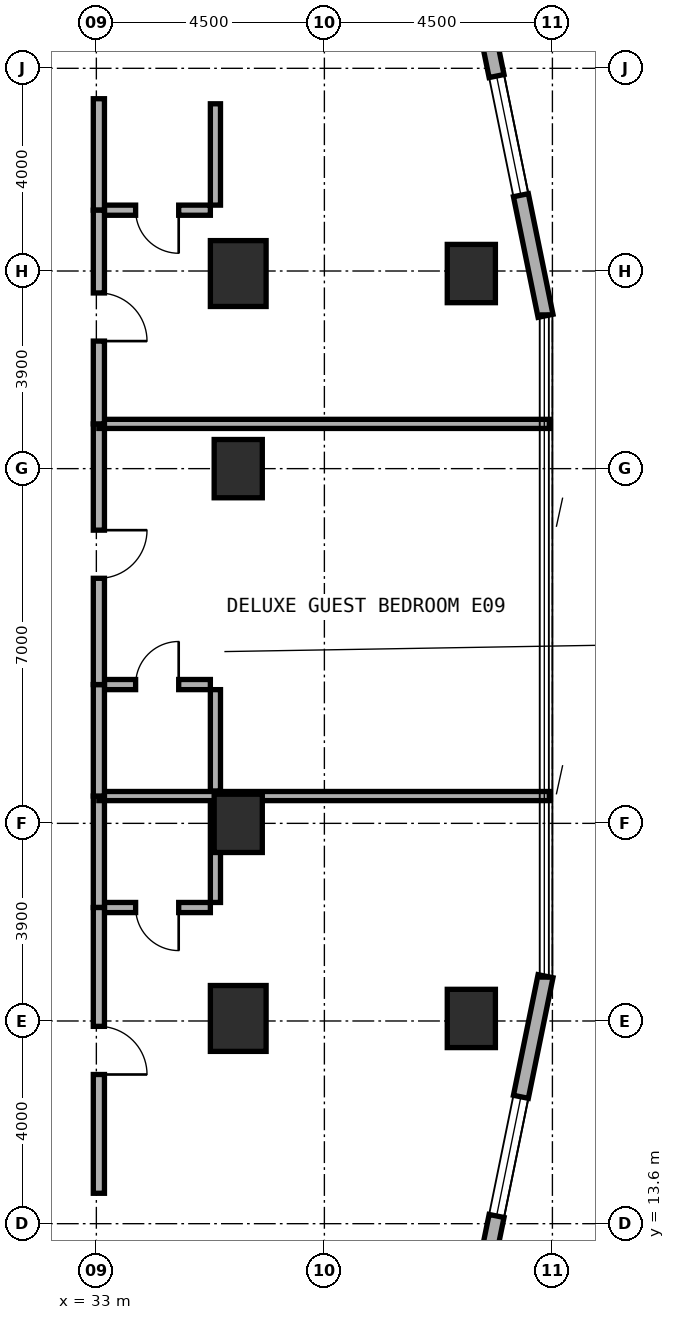
"""IFC4 building model, lengths in metres.
Left out: names, types, materials, properties, quantities, classifications, styles, units other than length and angle.
Written with IfcOpenShell. Run it as: python <this file> out.ifc"""

import sys

from ifc_helpers import new_model, si_unit, direction, frame, frame_2d, origin, origin_2d, place, context, subcontext, project, spatial, rectangle, extrude, element, fill, save


model = new_model("IFC4")
c1 = context("Model", 3, precision=1e-05, world=origin(), true_north=direction((0.0, 1.0)))
c2 = subcontext(c1, "Body", "Model", "MODEL_VIEW")
j1 = project(units=[si_unit("LENGTHUNIT", "METRE"), si_unit("PLANEANGLEUNIT", "RADIAN")], contexts=[c1])
p1 = place(None, origin())
s1 = spatial("IfcSite", under=j1, at=p1, CompositionType="ELEMENT")
p2 = place(p1, origin())
s2 = spatial("IfcBuilding", under=s1, at=p2, CompositionType="ELEMENT")
p3 = place(p2, frame((0.0, 0.0, 27.5)))
s3 = spatial("IfcBuildingStorey", under=s2, at=p3, CompositionType="ELEMENT", Elevation=27.5)
for number, where, z_axis, x_axis in (
    (1, (35.8, 21.5, 0.0), (0.0, 0.0, 1.0), (1.0, 0.0, 0.0)),
    (2, (35.8, 28.5, 0.0), (0.0, 0.0, 1.0), (1.0, 0.0, 0.0)),
):
    element("IfcColumn", number, at=place(p3, frame(where, z_axis=z_axis, x_axis=x_axis)), inside=s3, PredefinedType="COLUMN", context=c2, shape_type="SweptSolid", body=[
        extrude(rectangle(XDim=0.95, YDim=1.15, at=origin_2d()), origin(), (0.0, 0.0, 1.0), 3.5),
    ])
for number, where, z_axis, x_axis in (
    (3, (35.8, 17.65, 0.0), (0.0, 0.0, 1.0), (1.0, 0.0, 0.0)),
    (4, (35.8, 32.35, 0.0), (0.0, 0.0, 1.0), (1.0, 0.0, 0.0)),
):
    element("IfcColumn", number, at=place(p3, frame(where, z_axis=z_axis, x_axis=x_axis)), inside=s3, PredefinedType="COLUMN", context=c2, shape_type="SweptSolid", body=[
        extrude(rectangle(XDim=1.1, YDim=1.3, at=origin_2d()), origin(), (0.0, 0.0, 1.0), 3.5),
    ])
for number, where, z_axis, x_axis in (
    (5, (40.4, 17.65, 0.0), (0.0, 0.0, 1.0), (1.0, 0.0, 0.0)),
    (6, (40.4, 32.35, 0.0), (0.0, 0.0, 1.0), (1.0, 0.0, 0.0)),
):
    element("IfcColumn", number, at=place(p3, frame(where, z_axis=z_axis, x_axis=x_axis)), inside=s3, PredefinedType="COLUMN", context=c2, shape_type="SweptSolid", body=[
        extrude(rectangle(XDim=0.95, YDim=1.15, at=origin_2d()), origin(), (0.0, 0.0, 1.0), 3.5),
    ])
p4 = place(p3, frame((39.851, 8.622, 0.0), z_axis=(0.0, 0.0, 1.0), x_axis=(0.199990901713, 0.979797754249, 0.0)))
e7 = element("IfcWall", 7, at=p4, inside=s3, PredefinedType="STANDARD", context=c2, shape_type="SweptSolid", body=[
    extrude(rectangle(XDim=10.065, YDim=0.3, at=frame_2d((5.033, 0.0))), origin(), (0.0, 0.0, 1.0), 3.22),
])
p5 = place(p4, frame((0.378, 0.0, 0.85)))
e8 = element("IfcOpeningElement", 8, at=p5, cuts=e7, PredefinedType="OPENING", context=c2, shape_type="SweptSolid", body=[
    extrude(rectangle(XDim=1.8, YDim=1.5, at=frame_2d((0.9, 0.75))), frame((0.0, 0.16, 0.0), z_axis=(0.0, -1.0, 0.0), x_axis=(1.0, 0.0, 0.0)), (0.0, 0.0, 1.0), 0.32),
])
p6 = place(p4, frame((5.236, 0.0, 0.8)))
e9 = element("IfcOpeningElement", 9, at=p6, cuts=e7, PredefinedType="OPENING", context=c2, shape_type="SweptSolid", body=[
    extrude(rectangle(XDim=2.4, YDim=1.6, at=frame_2d((1.2, 0.8))), frame((0.0, 0.16, 0.0), z_axis=(0.0, -1.0, 0.0), x_axis=(1.0, 0.0, 0.0)), (0.0, 0.0, 1.0), 0.32),
])
p7 = place(p3, frame((41.864, 31.516, 0.0), z_axis=(0.0, 0.0, 1.0), x_axis=(-0.199990901713, 0.979797754249, 0.0)))
e10 = element("IfcWall", 10, at=p7, inside=s3, PredefinedType="STANDARD", context=c2, shape_type="SweptSolid", body=[
    extrude(rectangle(XDim=10.065, YDim=0.3, at=frame_2d((5.033, 0.0))), origin(), (0.0, 0.0, 1.0), 3.22),
])
p8 = place(p7, frame((2.429, 0.0, 0.8)))
e11 = element("IfcOpeningElement", 11, at=p8, cuts=e10, PredefinedType="OPENING", context=c2, shape_type="SweptSolid", body=[
    extrude(rectangle(XDim=2.4, YDim=1.6, at=frame_2d((1.2, 0.8))), frame((0.0, 0.16, 0.0), z_axis=(0.0, -1.0, 0.0), x_axis=(1.0, 0.0, 0.0)), (0.0, 0.0, 1.0), 0.32),
])
p9 = place(p7, frame((7.887, 0.0, 0.85)))
e12 = element("IfcOpeningElement", 12, at=p9, cuts=e10, PredefinedType="OPENING", context=c2, shape_type="SweptSolid", body=[
    extrude(rectangle(XDim=1.8, YDim=1.5, at=frame_2d((0.9, 0.75))), frame((0.0, 0.16, 0.0), z_axis=(0.0, -1.0, 0.0), x_axis=(1.0, 0.0, 0.0)), (0.0, 0.0, 1.0), 0.32),
])
p10 = place(p3, frame((33.15, 19.839, 0.0), z_axis=(0.0, 0.0, 1.0), x_axis=(1.0, 0.0, 0.0)))
e13 = element("IfcWall", 13, at=p10, inside=s3, PredefinedType="PLUMBINGWALL", context=c2, shape_type="SweptSolid", body=[
    extrude(rectangle(XDim=2.1, YDim=0.2, at=frame_2d((1.05, 0.0))), origin(), (0.0, 0.0, 1.0), 3.22),
])
p11 = place(p10, frame((0.625, 0.0, 0.0)))
e14 = element("IfcOpeningElement", 14, at=p11, cuts=e13, PredefinedType="OPENING", context=c2, shape_type="SweptSolid", body=[
    extrude(rectangle(XDim=0.85, YDim=2.1, at=frame_2d((0.425, 1.05))), frame((0.0, 0.11, 0.0), z_axis=(0.0, -1.0, 0.0), x_axis=(1.0, 0.0, 0.0)), (0.0, 0.0, 1.0), 0.22),
])
p12 = place(p3, frame((35.35, 19.939, 0.0), z_axis=(0.0, 0.0, 1.0), x_axis=(0.0, 1.0, 0.0)))
e15 = element("IfcWall", 15, at=p12, inside=s3, PredefinedType="PLUMBINGWALL", context=c2, shape_type="SweptSolid", body=[
    extrude(rectangle(XDim=2.0, YDim=0.2, at=frame_2d((1.0, 0.0))), origin(), (0.0, 0.0, 1.0), 2.395),
])
p13 = place(p3, frame((33.05, 19.839, 0.0), z_axis=(0.0, 0.0, 1.0), x_axis=(0.0, 1.0, 0.0)))
e16 = element("IfcWall", 16, at=p13, inside=s3, PredefinedType="SOLIDWALL", context=c2, shape_type="SweptSolid", body=[
    extrude(rectangle(XDim=2.2, YDim=0.22, at=frame_2d((1.1, 0.0))), origin(), (0.0, 0.0, 1.0), 2.395),
])
p14 = place(p3, frame((33.05, 14.2, 0.0), z_axis=(0.0, 0.0, 1.0), x_axis=(0.0, 1.0, 0.0)))
e17 = element("IfcWall", 17, at=p14, inside=s3, PredefinedType="SOLIDWALL", context=c2, shape_type="SweptSolid", body=[
    extrude(rectangle(XDim=5.639, YDim=0.22, at=frame_2d((2.82, 0.0))), origin(), (0.0, 0.0, 1.0), 2.395),
])
p15 = place(p14, frame((2.344, 0.0, 0.0)))
e18 = element("IfcOpeningElement", 18, at=p15, cuts=e17, PredefinedType="OPENING", context=c2, shape_type="SweptSolid", body=[
    extrude(rectangle(XDim=0.95, YDim=2.1, at=frame_2d((0.475, 1.05))), frame((0.0, 0.12, 0.0), z_axis=(0.0, -1.0, 0.0), x_axis=(1.0, 0.0, 0.0)), (0.0, 0.0, 1.0), 0.24),
])
p16 = place(p3, frame((33.05, 22.039, 0.0), z_axis=(0.0, 0.0, 1.0), x_axis=(1.0, 0.0, 0.0)))
e19 = element("IfcWall", 19, at=p16, inside=s3, PredefinedType="SOLIDWALL", context=c2, shape_type="SweptSolid", body=[
    extrude(rectangle(XDim=8.89, YDim=0.18, at=frame_2d((4.445, 0.0))), origin(), (0.0, 0.0, 1.0), 2.745),
])
p17 = place(p3, frame((33.15, 24.239, 0.0), z_axis=(0.0, 0.0, 1.0), x_axis=(1.0, 0.0, 0.0)))
e20 = element("IfcWall", 20, at=p17, inside=s3, PredefinedType="PLUMBINGWALL", context=c2, shape_type="SweptSolid", body=[
    extrude(rectangle(XDim=2.1, YDim=0.2, at=frame_2d((1.05, 0.0))), origin(), (0.0, 0.0, 1.0), 3.22),
])
p18 = place(p17, frame((0.625, 0.0, 0.0)))
e21 = element("IfcOpeningElement", 21, at=p18, cuts=e20, PredefinedType="OPENING", context=c2, shape_type="SweptSolid", body=[
    extrude(rectangle(XDim=0.85, YDim=2.1, at=frame_2d((0.425, 1.05))), frame((0.0, 0.11, 0.0), z_axis=(0.0, -1.0, 0.0), x_axis=(1.0, 0.0, 0.0)), (0.0, 0.0, 1.0), 0.22),
])
p19 = place(p3, frame((35.35, 22.139, 0.0), z_axis=(0.0, 0.0, 1.0), x_axis=(0.0, 1.0, 0.0)))
e22 = element("IfcWall", 22, at=p19, inside=s3, PredefinedType="PLUMBINGWALL", context=c2, shape_type="SweptSolid", body=[
    extrude(rectangle(XDim=2.0, YDim=0.2, at=frame_2d((1.0, 0.0))), origin(), (0.0, 0.0, 1.0), 3.22),
])
p20 = place(p3, frame((33.05, 22.039, 0.0), z_axis=(0.0, 0.0, 1.0), x_axis=(0.0, 1.0, 0.0)))
e23 = element("IfcWall", 23, at=p20, inside=s3, PredefinedType="SOLIDWALL", context=c2, shape_type="SweptSolid", body=[
    extrude(rectangle(XDim=2.2, YDim=0.22, at=frame_2d((1.1, 0.0))), origin(), (0.0, 0.0, 1.0), 3.22),
])
p21 = place(p3, frame((33.05, 24.239, 0.0), z_axis=(0.0, 0.0, 1.0), x_axis=(0.0, 1.0, 0.0)))
e24 = element("IfcWall", 24, at=p21, inside=s3, PredefinedType="SOLIDWALL", context=c2, shape_type="SweptSolid", body=[
    extrude(rectangle(XDim=5.144, YDim=0.22, at=frame_2d((2.572, 0.0))), origin(), (0.0, 0.0, 1.0), 2.395),
])
p22 = place(p21, frame((2.097, 0.0, 0.0)))
e25 = element("IfcOpeningElement", 25, at=p22, cuts=e24, PredefinedType="OPENING", context=c2, shape_type="SweptSolid", body=[
    extrude(rectangle(XDim=0.95, YDim=2.1, at=frame_2d((0.475, 1.05))), frame((0.0, 0.12, 0.0), z_axis=(0.0, -1.0, 0.0), x_axis=(1.0, 0.0, 0.0)), (0.0, 0.0, 1.0), 0.24),
])
p23 = place(p3, frame((33.05, 29.383, 0.0), z_axis=(0.0, 0.0, 1.0), x_axis=(1.0, 0.0, 0.0)))
e26 = element("IfcWall", 26, at=p23, inside=s3, PredefinedType="SOLIDWALL", context=c2, shape_type="SweptSolid", body=[
    extrude(rectangle(XDim=8.89, YDim=0.18, at=frame_2d((4.445, 0.0))), origin(), (0.0, 0.0, 1.0), 2.745),
])
p24 = place(p3, frame((33.15, 33.6, 0.0), z_axis=(0.0, 0.0, 1.0), x_axis=(1.0, 0.0, 0.0)))
e27 = element("IfcWall", 27, at=p24, inside=s3, PredefinedType="PLUMBINGWALL", context=c2, shape_type="SweptSolid", body=[
    extrude(rectangle(XDim=2.1, YDim=0.2, at=frame_2d((1.05, 0.0))), origin(), (0.0, 0.0, 1.0), 3.22),
])
p25 = place(p24, frame((0.625, 0.0, 0.0)))
e28 = element("IfcOpeningElement", 28, at=p25, cuts=e27, PredefinedType="OPENING", context=c2, shape_type="SweptSolid", body=[
    extrude(rectangle(XDim=0.85, YDim=2.1, at=frame_2d((0.425, 1.05))), frame((0.0, 0.11, 0.0), z_axis=(0.0, -1.0, 0.0), x_axis=(1.0, 0.0, 0.0)), (0.0, 0.0, 1.0), 0.22),
])
p26 = place(p3, frame((35.35, 33.7, 0.0), z_axis=(0.0, 0.0, 1.0), x_axis=(0.0, 1.0, 0.0)))
e29 = element("IfcWall", 29, at=p26, inside=s3, PredefinedType="PLUMBINGWALL", context=c2, shape_type="SweptSolid", body=[
    extrude(rectangle(XDim=2.0, YDim=0.2, at=frame_2d((1.0, 0.0))), origin(), (0.0, 0.0, 1.0), 2.745),
])
p27 = place(p3, frame((33.05, 33.6, 0.0), z_axis=(0.0, 0.0, 1.0), x_axis=(0.0, 1.0, 0.0)))
e30 = element("IfcWall", 30, at=p27, inside=s3, PredefinedType="SOLIDWALL", context=c2, shape_type="SweptSolid", body=[
    extrude(rectangle(XDim=2.2, YDim=0.22, at=frame_2d((1.1, 0.0))), origin(), (0.0, 0.0, 1.0), 3.22),
])
p28 = place(p3, frame((33.05, 29.383, 0.0), z_axis=(0.0, 0.0, 1.0), x_axis=(0.0, 1.0, 0.0)))
e31 = element("IfcWall", 31, at=p28, inside=s3, PredefinedType="SOLIDWALL", context=c2, shape_type="SweptSolid", body=[
    extrude(rectangle(XDim=4.217, YDim=0.22, at=frame_2d((2.108, 0.0))), origin(), (0.0, 0.0, 1.0), 2.395),
])
p29 = place(p28, frame((1.634, 0.0, 0.0)))
e32 = element("IfcOpeningElement", 32, at=p29, cuts=e31, PredefinedType="OPENING", context=c2, shape_type="SweptSolid", body=[
    extrude(rectangle(XDim=0.95, YDim=2.1, at=frame_2d((0.475, 1.05))), frame((0.0, 0.12, 0.0), z_axis=(0.0, -1.0, 0.0), x_axis=(1.0, 0.0, 0.0)), (0.0, 0.0, 1.0), 0.24),
])
p30 = place(p6, origin())
e33 = element("IfcWindow", 33, at=p30, inside=s3, PartitioningType="SINGLE_PANEL", PredefinedType="WINDOW", context=c2, shape_type="SweptSolid", body=[
    extrude(rectangle(XDim=2.4, YDim=1.6, at=frame_2d((1.2, 0.8))), frame((0.0, 0.03, 0.0), z_axis=(0.0, -1.0, 0.0), x_axis=(1.0, 0.0, 0.0)), (0.0, 0.0, 1.0), 0.06),
])
fill(e9, e33)
p31 = place(p8, origin())
e34 = element("IfcWindow", 34, at=p31, inside=s3, PartitioningType="SINGLE_PANEL", PredefinedType="WINDOW", context=c2, shape_type="SweptSolid", body=[
    extrude(rectangle(XDim=2.4, YDim=1.6, at=frame_2d((1.2, 0.8))), frame((0.0, 0.03, 0.0), z_axis=(0.0, -1.0, 0.0), x_axis=(1.0, 0.0, 0.0)), (0.0, 0.0, 1.0), 0.06),
])
fill(e11, e34)
p32 = place(p11, frame((0.85, 0.0, 0.0), z_axis=(0.0, 0.0, 1.0), x_axis=(-1.0, 0.0, 0.0)))
e35 = element("IfcDoor", 35, at=p32, inside=s3, OperationType="SINGLE_SWING_LEFT", PredefinedType="DOOR", context=c2, shape_type="SweptSolid", body=[
    extrude(rectangle(XDim=0.85, YDim=2.1, at=frame_2d((0.425, 1.05))), frame((0.0, 0.025, 0.0), z_axis=(0.0, -1.0, 0.0), x_axis=(1.0, 0.0, 0.0)), (0.0, 0.0, 1.0), 0.05),
])
fill(e14, e35)
p33 = place(p15, frame((0.95, 0.0, 0.0), z_axis=(0.0, 0.0, 1.0), x_axis=(-1.0, 0.0, 0.0)))
e36 = element("IfcDoor", 36, at=p33, inside=s3, OperationType="SINGLE_SWING_RIGHT", PredefinedType="DOOR", context=c2, shape_type="SweptSolid", body=[
    extrude(rectangle(XDim=0.95, YDim=2.1, at=frame_2d((0.475, 1.05))), frame((0.0, 0.025, 0.0), z_axis=(0.0, -1.0, 0.0), x_axis=(1.0, 0.0, 0.0)), (0.0, 0.0, 1.0), 0.05),
])
fill(e18, e36)
p34 = place(p18, origin())
e37 = element("IfcDoor", 37, at=p34, inside=s3, OperationType="SINGLE_SWING_RIGHT", PredefinedType="DOOR", context=c2, shape_type="SweptSolid", body=[
    extrude(rectangle(XDim=0.85, YDim=2.1, at=frame_2d((0.425, 1.05))), frame((0.0, 0.025, 0.0), z_axis=(0.0, -1.0, 0.0), x_axis=(1.0, 0.0, 0.0)), (0.0, 0.0, 1.0), 0.05),
])
fill(e21, e37)
p35 = place(p22, frame((0.95, 0.0, 0.0), z_axis=(0.0, 0.0, 1.0), x_axis=(-1.0, 0.0, 0.0)))
e38 = element("IfcDoor", 38, at=p35, inside=s3, OperationType="SINGLE_SWING_LEFT", PredefinedType="DOOR", context=c2, shape_type="SweptSolid", body=[
    extrude(rectangle(XDim=0.95, YDim=2.1, at=frame_2d((0.475, 1.05))), frame((0.0, 0.025, 0.0), z_axis=(0.0, -1.0, 0.0), x_axis=(1.0, 0.0, 0.0)), (0.0, 0.0, 1.0), 0.05),
])
fill(e25, e38)
p36 = place(p25, frame((0.85, 0.0, 0.0), z_axis=(0.0, 0.0, 1.0), x_axis=(-1.0, 0.0, 0.0)))
e39 = element("IfcDoor", 39, at=p36, inside=s3, OperationType="SINGLE_SWING_LEFT", PredefinedType="DOOR", context=c2, shape_type="SweptSolid", body=[
    extrude(rectangle(XDim=0.85, YDim=2.1, at=frame_2d((0.425, 1.05))), frame((0.0, 0.025, 0.0), z_axis=(0.0, -1.0, 0.0), x_axis=(1.0, 0.0, 0.0)), (0.0, 0.0, 1.0), 0.05),
])
fill(e28, e39)
p37 = place(p29, frame((0.95, 0.0, 0.0), z_axis=(0.0, 0.0, 1.0), x_axis=(-1.0, 0.0, 0.0)))
e40 = element("IfcDoor", 40, at=p37, inside=s3, OperationType="SINGLE_SWING_RIGHT", PredefinedType="DOOR", context=c2, shape_type="SweptSolid", body=[
    extrude(rectangle(XDim=0.95, YDim=2.1, at=frame_2d((0.475, 1.05))), frame((0.0, 0.025, 0.0), z_axis=(0.0, -1.0, 0.0), x_axis=(1.0, 0.0, 0.0)), (0.0, 0.0, 1.0), 0.05),
])
fill(e32, e40)
save(model, sys.argv[1])
